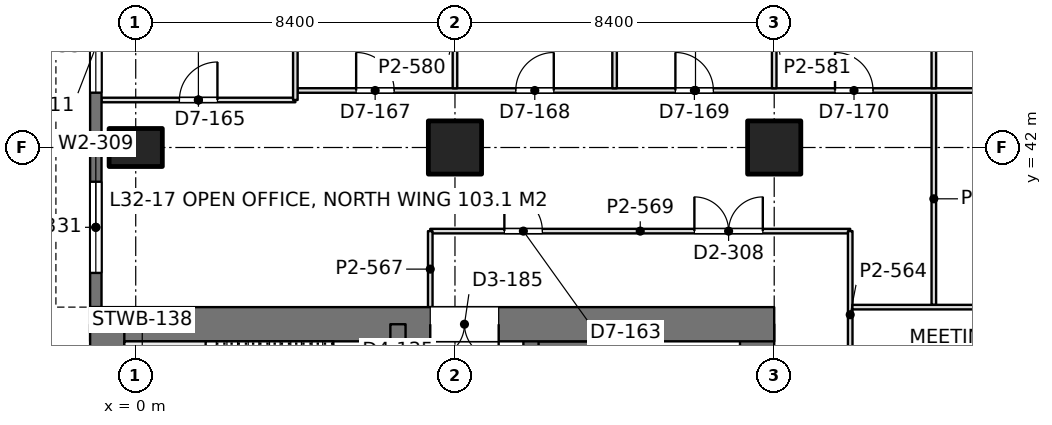
"""IFC4 building model, lengths in metres.
Left out: names, types, materials, properties, quantities, classifications, styles, units other than length and angle.
Written with IfcOpenShell. Run it as: python <this file> out.ifc"""

import sys

from ifc_helpers import new_model, si_unit, direction, frame, frame_2d, origin, origin_2d, place, context, subcontext, project, spatial, rectangle, extrude, element, fill, save


model = new_model("IFC4")
c1 = context("Model", 3, precision=1e-05, world=origin(), true_north=direction((0.0, 1.0)))
c2 = subcontext(c1, "Body", "Model", "MODEL_VIEW")
j1 = project(units=[si_unit("LENGTHUNIT", "METRE"), si_unit("PLANEANGLEUNIT", "RADIAN")], contexts=[c1])
p1 = place(None, origin())
s1 = spatial("IfcSite", under=j1, at=p1, CompositionType="ELEMENT")
p2 = place(p1, origin())
s2 = spatial("IfcBuilding", under=s1, at=p2, CompositionType="ELEMENT")
p3 = place(p2, frame((0.0, 0.0, 142.8)))
s3 = spatial("IfcBuildingStorey", under=s2, at=p3, CompositionType="ELEMENT", Elevation=142.8)
p4 = place(p3, frame((0.0, 42.0, 0.0), z_axis=(0.0, 0.0, 1.0), x_axis=(0.0, 1.0, 0.0)))
e1 = element("IfcColumn", 1, at=p4, inside=s3, PredefinedType="COLUMN", context=c2, shape_type="SweptSolid", body=[
    extrude(rectangle(XDim=1.0, YDim=1.4, at=origin_2d()), origin(), (0.0, 0.0, 1.0), 4.2),
])
for number, where, z_axis, x_axis in (
    (2, (8.4, 42.0, 0.0), (0.0, 0.0, 1.0), (1.0, 0.0, 0.0)),
    (3, (16.8, 42.0, 0.0), (0.0, 0.0, 1.0), (1.0, 0.0, 0.0)),
):
    element("IfcColumn", number, at=place(p3, frame(where, z_axis=z_axis, x_axis=x_axis)), inside=s3, PredefinedType="COLUMN", context=c2, shape_type="SweptSolid", body=[
        extrude(rectangle(XDim=1.4, YDim=1.4, at=origin_2d()), origin(), (0.0, 0.0, 1.0), 4.2),
    ])
p5 = place(p3, frame((-1.2, 37.35, 0.0), z_axis=(0.0, 0.0, 1.0), x_axis=(1.0, 0.0, 0.0)))
e4 = element("IfcWall", 4, at=p5, inside=s3, PredefinedType="SHEAR", context=c2, shape_type="SweptSolid", body=[
    extrude(rectangle(XDim=18.0, YDim=0.9, at=frame_2d((9.0, 0.0))), origin(), (0.0, 0.0, 1.0), 4.2),
])
p6 = place(p5, frame((8.95, 0.0, 0.0)))
e5 = element("IfcOpeningElement", 5, at=p6, cuts=e4, PredefinedType="OPENING", context=c2, shape_type="SweptSolid", body=[
    extrude(rectangle(XDim=1.8, YDim=2.4, at=frame_2d((0.9, 1.2))), frame((0.0, 0.46, 0.0), z_axis=(0.0, -1.0, 0.0), x_axis=(1.0, 0.0, 0.0)), (0.0, 0.0, 1.0), 0.92),
])
p7 = place(p3, frame((-0.75, 13.05, 0.0), z_axis=(0.0, 0.0, 1.0), x_axis=(0.0, 1.0, 0.0)))
e6 = element("IfcWall", 6, at=p7, inside=s3, PredefinedType="SHEAR", context=c2, shape_type="SweptSolid", body=[
    extrude(rectangle(XDim=24.3, YDim=0.9, at=frame_2d((12.15, 0.0))), origin(), (0.0, 0.0, 1.0), 4.2),
])
p8 = place(p3, frame((16.35, 22.1, 0.0), z_axis=(0.0, 0.0, 1.0), x_axis=(0.0, 1.0, 0.0)))
e7 = element("IfcWall", 7, at=p8, inside=s3, PredefinedType="SHEAR", context=c2, shape_type="SweptSolid", body=[
    extrude(rectangle(XDim=15.25, YDim=0.9, at=frame_2d((7.625, 0.0))), origin(), (0.0, 0.0, 1.0), 4.2),
])
p9 = place(p3, frame((6.9, 13.05, 0.0), z_axis=(0.0, 0.0, 1.0), x_axis=(0.0, 1.0, 0.0)))
e8 = element("IfcWall", 8, at=p9, inside=s3, PredefinedType="SHEAR", context=c2, shape_type="SweptSolid", body=[
    extrude(rectangle(XDim=24.3, YDim=0.4, at=frame_2d((12.15, 0.0))), origin(), (0.0, 0.0, 1.0), 4.2),
])
p10 = place(p9, frame((1.3, 0.0, 0.0)))
e9 = element("IfcOpeningElement", 9, at=p10, cuts=e8, PredefinedType="OPENING", context=c2, shape_type="SweptSolid", body=[
    extrude(rectangle(XDim=1.0, YDim=2.2, at=frame_2d((0.5, 1.1))), frame((0.0, 0.21, 0.0), z_axis=(0.0, -1.0, 0.0), x_axis=(1.0, 0.0, 0.0)), (0.0, 0.0, 1.0), 0.42),
])
p11 = place(p9, frame((22.0, 0.0, 0.0)))
e10 = element("IfcOpeningElement", 10, at=p11, cuts=e8, PredefinedType="OPENING", context=c2, shape_type="SweptSolid", body=[
    extrude(rectangle(XDim=1.0, YDim=2.2, at=frame_2d((0.5, 1.1))), frame((0.0, 0.21, 0.0), z_axis=(0.0, -1.0, 0.0), x_axis=(1.0, 0.0, 0.0)), (0.0, 0.0, 1.0), 0.42),
])
p12 = place(p9, frame((5.55, 0.0, 0.0)))
e11 = element("IfcOpeningElement", 11, at=p12, cuts=e8, PredefinedType="OPENING", context=c2, shape_type="SweptSolid", body=[
    extrude(rectangle(XDim=1.0, YDim=2.2, at=frame_2d((0.5, 1.1))), frame((0.0, 0.21, 0.0), z_axis=(0.0, -1.0, 0.0), x_axis=(1.0, 0.0, 0.0)), (0.0, 0.0, 1.0), 0.42),
])
p13 = place(p9, frame((9.55, 0.0, 0.0)))
e12 = element("IfcOpeningElement", 12, at=p13, cuts=e8, PredefinedType="OPENING", context=c2, shape_type="SweptSolid", body=[
    extrude(rectangle(XDim=1.0, YDim=2.2, at=frame_2d((0.5, 1.1))), frame((0.0, 0.21, 0.0), z_axis=(0.0, -1.0, 0.0), x_axis=(1.0, 0.0, 0.0)), (0.0, 0.0, 1.0), 0.42),
])
p14 = place(p9, frame((12.8, 0.0, 0.0)))
e13 = element("IfcOpeningElement", 13, at=p14, cuts=e8, PredefinedType="OPENING", context=c2, shape_type="SweptSolid", body=[
    extrude(rectangle(XDim=1.1, YDim=2.2, at=frame_2d((0.55, 1.1))), frame((0.0, 0.21, 0.0), z_axis=(0.0, -1.0, 0.0), x_axis=(1.0, 0.0, 0.0)), (0.0, 0.0, 1.0), 0.42),
])
p15 = place(p9, frame((15.538, 0.0, 0.0)))
e14 = element("IfcOpeningElement", 14, at=p15, cuts=e8, PredefinedType="OPENING", context=c2, shape_type="SweptSolid", body=[
    extrude(rectangle(XDim=1.1, YDim=2.2, at=frame_2d((0.55, 1.1))), frame((0.0, 0.21, 0.0), z_axis=(0.0, -1.0, 0.0), x_axis=(1.0, 0.0, 0.0)), (0.0, 0.0, 1.0), 0.42),
])
p16 = place(p9, frame((18.262, 0.0, 0.0)))
e15 = element("IfcOpeningElement", 15, at=p16, cuts=e8, PredefinedType="OPENING", context=c2, shape_type="SweptSolid", body=[
    extrude(rectangle(XDim=1.1, YDim=2.2, at=frame_2d((0.55, 1.1))), frame((0.0, 0.21, 0.0), z_axis=(0.0, -1.0, 0.0), x_axis=(1.0, 0.0, 0.0)), (0.0, 0.0, 1.0), 0.42),
])
p17 = place(p3, frame((10.4, 13.05, 0.0), z_axis=(0.0, 0.0, 1.0), x_axis=(0.0, 1.0, 0.0)))
e16 = element("IfcWall", 16, at=p17, inside=s3, PredefinedType="SHEAR", context=c2, shape_type="SweptSolid", body=[
    extrude(rectangle(XDim=24.3, YDim=0.4, at=frame_2d((12.15, 0.0))), origin(), (0.0, 0.0, 1.0), 4.2),
])
p18 = place(p17, frame((10.05, 0.0, 0.0)))
e17 = element("IfcOpeningElement", 17, at=p18, cuts=e16, PredefinedType="OPENING", context=c2, shape_type="SweptSolid", body=[
    extrude(rectangle(XDim=1.1, YDim=2.2, at=frame_2d((0.55, 1.1))), frame((0.0, 0.21, 0.0), z_axis=(0.0, -1.0, 0.0), x_axis=(1.0, 0.0, 0.0)), (0.0, 0.0, 1.0), 0.42),
])
p19 = place(p17, frame((12.9, 0.0, 0.0)))
e18 = element("IfcOpeningElement", 18, at=p19, cuts=e16, PredefinedType="OPENING", context=c2, shape_type="SweptSolid", body=[
    extrude(rectangle(XDim=1.1, YDim=2.2, at=frame_2d((0.55, 1.1))), frame((0.0, 0.21, 0.0), z_axis=(0.0, -1.0, 0.0), x_axis=(1.0, 0.0, 0.0)), (0.0, 0.0, 1.0), 0.42),
])
p20 = place(p17, frame((21.45, 0.0, 0.0)))
e19 = element("IfcOpeningElement", 19, at=p20, cuts=e16, PredefinedType="OPENING", context=c2, shape_type="SweptSolid", body=[
    extrude(rectangle(XDim=1.1, YDim=2.2, at=frame_2d((0.55, 1.1))), frame((0.0, 0.21, 0.0), z_axis=(0.0, -1.0, 0.0), x_axis=(1.0, 0.0, 0.0)), (0.0, 0.0, 1.0), 0.42),
])
p21 = place(p17, frame((2.25, 0.0, 0.0)))
e20 = element("IfcOpeningElement", 20, at=p21, cuts=e16, PredefinedType="OPENING", context=c2, shape_type="SweptSolid", body=[
    extrude(rectangle(XDim=1.8, YDim=2.4, at=frame_2d((0.9, 1.2))), frame((0.0, 0.21, 0.0), z_axis=(0.0, -1.0, 0.0), x_axis=(1.0, 0.0, 0.0)), (0.0, 0.0, 1.0), 0.42),
])
p22 = place(p17, frame((5.8, 0.0, 0.0)))
e21 = element("IfcOpeningElement", 21, at=p22, cuts=e16, PredefinedType="OPENING", context=c2, shape_type="SweptSolid", body=[
    extrude(rectangle(XDim=1.8, YDim=2.4, at=frame_2d((0.9, 1.2))), frame((0.0, 0.21, 0.0), z_axis=(0.0, -1.0, 0.0), x_axis=(1.0, 0.0, 0.0)), (0.0, 0.0, 1.0), 0.42),
])
p23 = place(p3, frame((13.6, 22.225, 0.0), z_axis=(0.0, 0.0, 1.0), x_axis=(0.0, 1.0, 0.0)))
e22 = element("IfcWall", 22, at=p23, inside=s3, PredefinedType="SHEAR", context=c2, shape_type="SweptSolid", body=[
    extrude(rectangle(XDim=15.125, YDim=0.4, at=frame_2d((7.562, 0.0))), origin(), (0.0, 0.0, 1.0), 4.2),
])
p24 = place(p3, frame((10.4, 36.625, 0.0), z_axis=(0.0, 0.0, 1.0), x_axis=(1.0, 0.0, 0.0)))
e23 = element("IfcWall", 23, at=p24, inside=s3, PredefinedType="SHEAR", context=c2, shape_type="SweptSolid", body=[
    extrude(rectangle(XDim=3.2, YDim=0.55, at=frame_2d((1.6, 0.0))), origin(), (0.0, 0.0, 1.0), 4.2),
])
p25 = place(p3, frame((-1.05, 37.8, 0.0), z_axis=(0.0, 0.0, 1.0), x_axis=(0.0, 1.0, 0.0)))
e24 = element("IfcWall", 24, at=p25, inside=s3, PredefinedType="SOLIDWALL", context=c2, shape_type="SweptSolid", body=[
    extrude(rectangle(XDim=4.2, YDim=0.3, at=frame_2d((2.1, 0.0))), origin(), (0.0, 0.0, 1.0), 4.05),
])
p26 = place(p25, frame((0.9, 0.0, 0.9)))
e25 = element("IfcOpeningElement", 25, at=p26, cuts=e24, PredefinedType="OPENING", context=c2, shape_type="SweptSolid", body=[
    extrude(rectangle(XDim=2.4, YDim=1.9, at=frame_2d((1.2, 0.95))), frame((0.0, 0.16, 0.0), z_axis=(0.0, -1.0, 0.0), x_axis=(1.0, 0.0, 0.0)), (0.0, 0.0, 1.0), 0.32),
])
p27 = place(p3, frame((-1.05, 42.0, 0.0), z_axis=(0.0, 0.0, 1.0), x_axis=(0.0, 1.0, 0.0)))
e26 = element("IfcWall", 26, at=p27, inside=s3, PredefinedType="SOLIDWALL", context=c2, shape_type="SweptSolid", body=[
    extrude(rectangle(XDim=5.285, YDim=0.3, at=frame_2d((2.643, 0.0))), origin(), (0.0, 0.0, 1.0), 4.05),
])
p28 = place(p27, frame((1.443, 0.0, 0.9)))
e27 = element("IfcOpeningElement", 27, at=p28, cuts=e26, PredefinedType="OPENING", context=c2, shape_type="SweptSolid", body=[
    extrude(rectangle(XDim=2.4, YDim=1.9, at=frame_2d((1.2, 0.95))), frame((0.0, 0.16, 0.0), z_axis=(0.0, -1.0, 0.0), x_axis=(1.0, 0.0, 0.0)), (0.0, 0.0, 1.0), 0.32),
])
p29 = place(p3, frame((-0.902, 43.25, 0.0), z_axis=(0.0, 0.0, 1.0), x_axis=(1.0, 0.0, 0.0)))
e28 = element("IfcWall", 28, at=p29, inside=s3, PredefinedType="PARTITIONING", context=c2, shape_type="SweptSolid", body=[
    extrude(rectangle(XDim=5.102, YDim=0.12, at=frame_2d((2.551, 0.0))), origin(), (0.0, 0.0, 1.0), 3.56),
])
p30 = place(p29, frame((2.052, 0.0, 0.0)))
e29 = element("IfcOpeningElement", 29, at=p30, cuts=e28, PredefinedType="OPENING", context=c2, shape_type="SweptSolid", body=[
    extrude(rectangle(XDim=1.0, YDim=2.4, at=frame_2d((0.5, 1.2))), frame((0.0, 0.07, 0.0), z_axis=(0.0, -1.0, 0.0), x_axis=(1.0, 0.0, 0.0)), (0.0, 0.0, 1.0), 0.14),
])
p31 = place(p3, frame((4.258, 43.5, 0.0), z_axis=(0.0, 0.0, 1.0), x_axis=(1.0, 0.0, 0.0)))
e30 = element("IfcWall", 30, at=p31, inside=s3, PredefinedType="PARTITIONING", context=c2, shape_type="SweptSolid", body=[
    extrude(rectangle(XDim=20.942, YDim=0.12, at=frame_2d((10.471, 0.0))), origin(), (0.0, 0.0, 1.0), 3.55),
])
p32 = place(p31, frame((1.542, 0.0, 0.0)))
e31 = element("IfcOpeningElement", 31, at=p32, cuts=e30, PredefinedType="OPENING", context=c2, shape_type="SweptSolid", body=[
    extrude(rectangle(XDim=1.0, YDim=2.4, at=frame_2d((0.5, 1.2))), frame((0.0, 0.07, 0.0), z_axis=(0.0, -1.0, 0.0), x_axis=(1.0, 0.0, 0.0)), (0.0, 0.0, 1.0), 0.14),
])
p33 = place(p31, frame((5.742, 0.0, 0.0)))
e32 = element("IfcOpeningElement", 32, at=p33, cuts=e30, PredefinedType="OPENING", context=c2, shape_type="SweptSolid", body=[
    extrude(rectangle(XDim=1.0, YDim=2.4, at=frame_2d((0.5, 1.2))), frame((0.0, 0.07, 0.0), z_axis=(0.0, -1.0, 0.0), x_axis=(1.0, 0.0, 0.0)), (0.0, 0.0, 1.0), 0.14),
])
p34 = place(p31, frame((9.942, 0.0, 0.0)))
e33 = element("IfcOpeningElement", 33, at=p34, cuts=e30, PredefinedType="OPENING", context=c2, shape_type="SweptSolid", body=[
    extrude(rectangle(XDim=1.0, YDim=2.4, at=frame_2d((0.5, 1.2))), frame((0.0, 0.07, 0.0), z_axis=(0.0, -1.0, 0.0), x_axis=(1.0, 0.0, 0.0)), (0.0, 0.0, 1.0), 0.14),
])
p35 = place(p31, frame((14.142, 0.0, 0.0)))
e34 = element("IfcOpeningElement", 34, at=p35, cuts=e30, PredefinedType="OPENING", context=c2, shape_type="SweptSolid", body=[
    extrude(rectangle(XDim=1.0, YDim=2.4, at=frame_2d((0.5, 1.2))), frame((0.0, 0.07, 0.0), z_axis=(0.0, -1.0, 0.0), x_axis=(1.0, 0.0, 0.0)), (0.0, 0.0, 1.0), 0.14),
])
p36 = place(p31, frame((18.342, 0.0, 0.0)))
e35 = element("IfcOpeningElement", 35, at=p36, cuts=e30, PredefinedType="OPENING", context=c2, shape_type="SweptSolid", body=[
    extrude(rectangle(XDim=1.0, YDim=2.4, at=frame_2d((0.5, 1.2))), frame((0.0, 0.07, 0.0), z_axis=(0.0, -1.0, 0.0), x_axis=(1.0, 0.0, 0.0)), (0.0, 0.0, 1.0), 0.14),
])
p37 = place(p3, frame((4.2, 43.25, 0.0), z_axis=(0.0, 0.0, 1.0), x_axis=(0.0, 1.0, 0.0)))
e36 = element("IfcWall", 36, at=p37, inside=s3, PredefinedType="PARTITIONING", context=c2, shape_type="SweptSolid", body=[
    extrude(rectangle(XDim=5.252, YDim=0.12, at=frame_2d((2.626, 0.0))), origin(), (0.0, 0.0, 1.0), 3.56),
])
p38 = place(p3, frame((8.4, 43.558, 0.0), z_axis=(0.0, 0.0, 1.0), x_axis=(0.0, 1.0, 0.0)))
e37 = element("IfcWall", 37, at=p38, inside=s3, PredefinedType="PARTITIONING", context=c2, shape_type="SweptSolid", body=[
    extrude(rectangle(XDim=3.343, YDim=0.12, at=frame_2d((1.671, 0.0))), origin(), (0.0, 0.0, 1.0), 3.55),
])
p39 = place(p3, frame((12.6, 43.558, 0.0), z_axis=(0.0, 0.0, 1.0), x_axis=(0.0, 1.0, 0.0)))
e38 = element("IfcWall", 38, at=p39, inside=s3, PredefinedType="PARTITIONING", context=c2, shape_type="SweptSolid", body=[
    extrude(rectangle(XDim=4.944, YDim=0.12, at=frame_2d((2.472, 0.0))), origin(), (0.0, 0.0, 1.0), 3.56),
])
p40 = place(p3, frame((16.8, 43.558, 0.0), z_axis=(0.0, 0.0, 1.0), x_axis=(0.0, 1.0, 0.0)))
e39 = element("IfcWall", 39, at=p40, inside=s3, PredefinedType="PARTITIONING", context=c2, shape_type="SweptSolid", body=[
    extrude(rectangle(XDim=3.343, YDim=0.12, at=frame_2d((1.671, 0.0))), origin(), (0.0, 0.0, 1.0), 3.55),
])
p41 = place(p3, frame((21.0, 43.558, 0.0), z_axis=(0.0, 0.0, 1.0), x_axis=(0.0, 1.0, 0.0)))
e40 = element("IfcWall", 40, at=p41, inside=s3, PredefinedType="PARTITIONING", context=c2, shape_type="SweptSolid", body=[
    extrude(rectangle(XDim=4.944, YDim=0.12, at=frame_2d((2.472, 0.0))), origin(), (0.0, 0.0, 1.0), 3.56),
])
p42 = place(p3, frame((21.0, 37.858, 0.0), z_axis=(0.0, 0.0, 1.0), x_axis=(0.0, 1.0, 0.0)))
e41 = element("IfcWall", 41, at=p42, inside=s3, PredefinedType="PARTITIONING", context=c2, shape_type="SweptSolid", body=[
    extrude(rectangle(XDim=5.584, YDim=0.12, at=frame_2d((2.792, 0.0))), origin(), (0.0, 0.0, 1.0), 3.55),
])
p43 = place(p3, frame((7.75, 39.8, 0.0), z_axis=(0.0, 0.0, 1.0), x_axis=(1.0, 0.0, 0.0)))
e42 = element("IfcWall", 42, at=p43, inside=s3, PredefinedType="PARTITIONING", context=c2, shape_type="SweptSolid", body=[
    extrude(rectangle(XDim=11.05, YDim=0.12, at=frame_2d((5.525, 0.0))), origin(), (0.0, 0.0, 1.0), 3.69),
])
p44 = place(p43, frame((1.95, 0.0, 0.0)))
e43 = element("IfcOpeningElement", 43, at=p44, cuts=e42, PredefinedType="OPENING", context=c2, shape_type="SweptSolid", body=[
    extrude(rectangle(XDim=1.0, YDim=2.4, at=frame_2d((0.5, 1.2))), frame((0.0, 0.07, 0.0), z_axis=(0.0, -1.0, 0.0), x_axis=(1.0, 0.0, 0.0)), (0.0, 0.0, 1.0), 0.14),
])
p45 = place(p43, frame((6.95, 0.0, 0.0)))
e44 = element("IfcOpeningElement", 44, at=p45, cuts=e42, PredefinedType="OPENING", context=c2, shape_type="SweptSolid", body=[
    extrude(rectangle(XDim=1.8, YDim=2.2, at=frame_2d((0.9, 1.1))), frame((0.0, 0.07, 0.0), z_axis=(0.0, -1.0, 0.0), x_axis=(1.0, 0.0, 0.0)), (0.0, 0.0, 1.0), 0.14),
])
p46 = place(p3, frame((7.75, 37.8, 0.0), z_axis=(0.0, 0.0, 1.0), x_axis=(0.0, 1.0, 0.0)))
e45 = element("IfcWall", 45, at=p46, inside=s3, PredefinedType="PARTITIONING", context=c2, shape_type="SweptSolid", body=[
    extrude(rectangle(XDim=2.0, YDim=0.12, at=frame_2d((1.0, 0.0))), origin(), (0.0, 0.0, 1.0), 4.05),
])
p47 = place(p3, frame((18.8, 35.4, 0.0), z_axis=(0.0, 0.0, 1.0), x_axis=(0.0, 1.0, 0.0)))
e46 = element("IfcWall", 46, at=p47, inside=s3, PredefinedType="PARTITIONING", context=c2, shape_type="SweptSolid", body=[
    extrude(rectangle(XDim=4.4, YDim=0.12, at=frame_2d((2.2, 0.0))), origin(), (0.0, 0.0, 1.0), 4.05),
])
p48 = place(p3, frame((18.858, 37.8, 0.0), z_axis=(0.0, 0.0, 1.0), x_axis=(1.0, 0.0, 0.0)))
e47 = element("IfcWall", 47, at=p48, inside=s3, PredefinedType="PARTITIONING", context=c2, shape_type="SweptSolid", body=[
    extrude(rectangle(XDim=12.684, YDim=0.12, at=frame_2d((6.342, 0.0))), origin(), (0.0, 0.0, 1.0), 3.55),
])
p49 = place(p26, origin())
e48 = element("IfcWindow", 48, at=p49, inside=s3, PartitioningType="SINGLE_PANEL", PredefinedType="WINDOW", context=c2, shape_type="SweptSolid", body=[
    extrude(rectangle(XDim=2.4, YDim=1.9, at=frame_2d((1.2, 0.95))), frame((0.0, 0.03, 0.0), z_axis=(0.0, -1.0, 0.0), x_axis=(1.0, 0.0, 0.0)), (0.0, 0.0, 1.0), 0.06),
])
fill(e25, e48)
p50 = place(p28, origin())
e49 = element("IfcWindow", 49, at=p50, inside=s3, PartitioningType="SINGLE_PANEL", PredefinedType="WINDOW", context=c2, shape_type="SweptSolid", body=[
    extrude(rectangle(XDim=2.4, YDim=1.9, at=frame_2d((1.2, 0.95))), frame((0.0, 0.03, 0.0), z_axis=(0.0, -1.0, 0.0), x_axis=(1.0, 0.0, 0.0)), (0.0, 0.0, 1.0), 0.06),
])
fill(e27, e49)
p51 = place(p6, frame((1.8, 0.0, 0.0), z_axis=(0.0, 0.0, 1.0), x_axis=(-1.0, 0.0, 0.0)))
e50 = element("IfcDoor", 50, at=p51, inside=s3, OperationType="DOUBLE_DOOR_SINGLE_SWING", PredefinedType="DOOR", context=c2, shape_type="SweptSolid", body=[
    extrude(rectangle(XDim=1.8, YDim=2.4, at=frame_2d((0.9, 1.2))), frame((0.0, 0.025, 0.0), z_axis=(0.0, -1.0, 0.0), x_axis=(1.0, 0.0, 0.0)), (0.0, 0.0, 1.0), 0.05),
])
fill(e5, e50)
p52 = place(p30, origin())
e51 = element("IfcDoor", 51, at=p52, inside=s3, OperationType="SINGLE_SWING_RIGHT", PredefinedType="DOOR", context=c2, shape_type="SweptSolid", body=[
    extrude(rectangle(XDim=1.0, YDim=2.4, at=frame_2d((0.5, 1.2))), frame((0.0, 0.025, 0.0), z_axis=(0.0, -1.0, 0.0), x_axis=(1.0, 0.0, 0.0)), (0.0, 0.0, 1.0), 0.05),
])
fill(e29, e51)
p53 = place(p32, origin())
e52 = element("IfcDoor", 52, at=p53, inside=s3, OperationType="SINGLE_SWING_LEFT", PredefinedType="DOOR", context=c2, shape_type="SweptSolid", body=[
    extrude(rectangle(XDim=1.0, YDim=2.4, at=frame_2d((0.5, 1.2))), frame((0.0, 0.025, 0.0), z_axis=(0.0, -1.0, 0.0), x_axis=(1.0, 0.0, 0.0)), (0.0, 0.0, 1.0), 0.05),
])
fill(e31, e52)
p54 = place(p33, origin())
e53 = element("IfcDoor", 53, at=p54, inside=s3, OperationType="SINGLE_SWING_RIGHT", PredefinedType="DOOR", context=c2, shape_type="SweptSolid", body=[
    extrude(rectangle(XDim=1.0, YDim=2.4, at=frame_2d((0.5, 1.2))), frame((0.0, 0.025, 0.0), z_axis=(0.0, -1.0, 0.0), x_axis=(1.0, 0.0, 0.0)), (0.0, 0.0, 1.0), 0.05),
])
fill(e32, e53)
p55 = place(p34, origin())
e54 = element("IfcDoor", 54, at=p55, inside=s3, OperationType="SINGLE_SWING_LEFT", PredefinedType="DOOR", context=c2, shape_type="SweptSolid", body=[
    extrude(rectangle(XDim=1.0, YDim=2.4, at=frame_2d((0.5, 1.2))), frame((0.0, 0.025, 0.0), z_axis=(0.0, -1.0, 0.0), x_axis=(1.0, 0.0, 0.0)), (0.0, 0.0, 1.0), 0.05),
])
fill(e33, e54)
p56 = place(p35, origin())
e55 = element("IfcDoor", 55, at=p56, inside=s3, OperationType="SINGLE_SWING_LEFT", PredefinedType="DOOR", context=c2, shape_type="SweptSolid", body=[
    extrude(rectangle(XDim=1.0, YDim=2.4, at=frame_2d((0.5, 1.2))), frame((0.0, 0.025, 0.0), z_axis=(0.0, -1.0, 0.0), x_axis=(1.0, 0.0, 0.0)), (0.0, 0.0, 1.0), 0.05),
])
fill(e34, e55)
p57 = place(p44, origin())
e56 = element("IfcDoor", 56, at=p57, inside=s3, OperationType="SINGLE_SWING_LEFT", PredefinedType="DOOR", context=c2, shape_type="SweptSolid", body=[
    extrude(rectangle(XDim=1.0, YDim=2.4, at=frame_2d((0.5, 1.2))), frame((0.0, 0.025, 0.0), z_axis=(0.0, -1.0, 0.0), x_axis=(1.0, 0.0, 0.0)), (0.0, 0.0, 1.0), 0.05),
])
fill(e43, e56)
p58 = place(p45, origin())
e57 = element("IfcDoor", 57, at=p58, inside=s3, OperationType="DOUBLE_DOOR_SINGLE_SWING", PredefinedType="DOOR", context=c2, shape_type="SweptSolid", body=[
    extrude(rectangle(XDim=1.8, YDim=2.2, at=frame_2d((0.9, 1.1))), frame((0.0, 0.025, 0.0), z_axis=(0.0, -1.0, 0.0), x_axis=(1.0, 0.0, 0.0)), (0.0, 0.0, 1.0), 0.05),
])
fill(e44, e57)
save(model, sys.argv[1])
